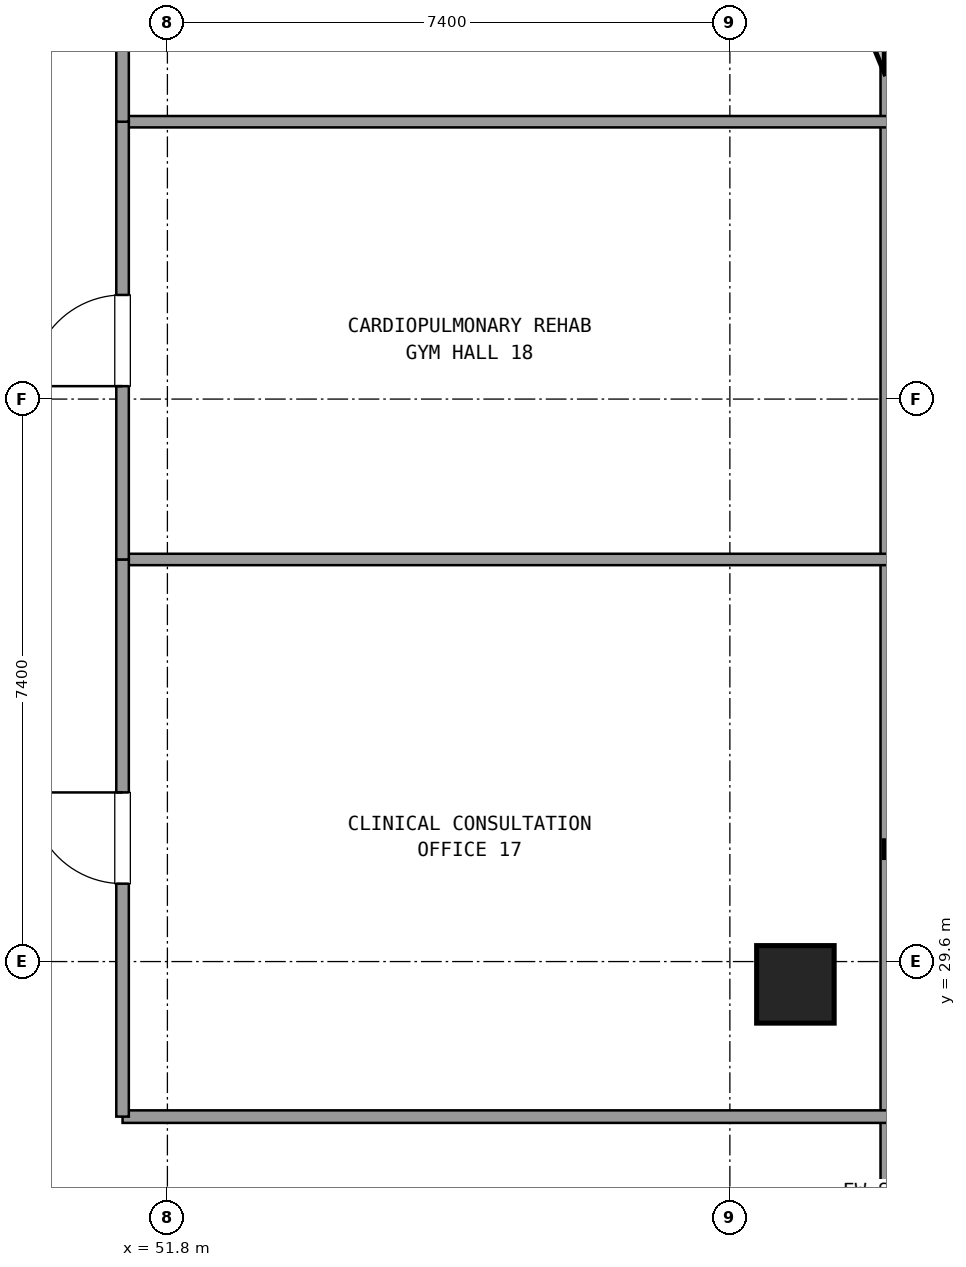
"""IFC4 building model, lengths in metres.
Left out: names, types, materials, properties, quantities, classifications, styles, units other than length and angle.
Written with IfcOpenShell. Run it as: python <this file> out.ifc"""

import sys

from ifc_helpers import new_model, si_unit, direction, frame, frame_2d, origin, origin_2d, place, context, subcontext, project, spatial, rectangle, extrude, element, fill, save


model = new_model("IFC4")
c1 = context("Model", 3, precision=1e-05, world=origin(), true_north=direction((0.0, 1.0)))
c2 = subcontext(c1, "Body", "Model", "MODEL_VIEW")
j1 = project(units=[si_unit("LENGTHUNIT", "METRE"), si_unit("PLANEANGLEUNIT", "RADIAN")], contexts=[c1])
p1 = place(None, origin())
s1 = spatial("IfcSite", under=j1, at=p1, CompositionType="ELEMENT")
p2 = place(p1, origin())
s2 = spatial("IfcBuilding", under=s1, at=p2, CompositionType="ELEMENT")
p3 = place(p2, frame((0.0, 0.0, 117.18)))
s3 = spatial("IfcBuildingStorey", under=s2, at=p3, CompositionType="ELEMENT", Elevation=117.18)
p4 = place(p3, frame((60.062, 29.3, 0.021), z_axis=(-0.084573087246, 0.0, 0.99641727851), x_axis=(0.0, -1.0, 0.0)))
e1 = element("IfcColumn", 1, at=p4, inside=s3, PredefinedType="COLUMN", context=c2, shape_type="SweptSolid", body=[
    extrude(rectangle(XDim=1.02, YDim=1.02, at=origin_2d()), origin(), (0.0, 0.0, 1.0), 3.571),
])
p5 = place(p3, frame((56.141, 42.252, 0.021), z_axis=(-0.084546909741, -0.024878799633, 0.996108862214), x_axis=(0.282292283154, -0.959328445774, 0.0)))
e2 = element("IfcColumn", 2, at=p5, inside=s3, PredefinedType="COLUMN", context=c2, shape_type="SweptSolid", body=[
    extrude(rectangle(XDim=1.02, YDim=1.02, at=origin_2d()), origin(), (0.0, 0.0, 1.0), 3.572),
])
p6 = place(p3, frame((61.302, 10.363, 0.0), z_axis=(0.0, 0.0, 1.0), x_axis=(0.0, 1.0, 0.0)))
e3 = element("IfcWall", 3, at=p6, inside=s3, PredefinedType="SOLIDWALL", context=c2, shape_type="SweptSolid", body=[
    extrude(rectangle(XDim=31.074, YDim=0.24, at=frame_2d((15.537, 0.0))), origin(), (0.0, 0.0, 1.0), 0.85),
])
p7 = place(p3, frame((51.21, 27.56, 0.0), z_axis=(0.0, 0.0, 1.0), x_axis=(1.0, 0.0, 0.0)))
e4 = element("IfcWall", 4, at=p7, inside=s3, PredefinedType="PARTITIONING", context=c2, shape_type="SweptSolid", body=[
    extrude(rectangle(XDim=10.072, YDim=0.165, at=frame_2d((5.036, 0.0))), origin(), (0.0, 0.0, 1.0), 2.61),
])
p8 = place(p3, frame((51.21, 34.89, 0.0), z_axis=(0.0, 0.0, 1.0), x_axis=(1.0, 0.0, 0.0)))
e5 = element("IfcWall", 5, at=p8, inside=s3, PredefinedType="PARTITIONING", context=c2, shape_type="SweptSolid", body=[
    extrude(rectangle(XDim=10.072, YDim=0.15, at=frame_2d((5.036, 0.0))), origin(), (0.0, 0.0, 1.0), 2.61),
])
p9 = place(p3, frame((51.21, 27.56, 0.0), z_axis=(0.0, 0.0, 1.0), x_axis=(0.0, 1.0, 0.0)))
e6 = element("IfcWall", 6, at=p9, inside=s3, PredefinedType="PARTITIONING", context=c2, shape_type="SweptSolid", body=[
    extrude(rectangle(XDim=7.33, YDim=0.165, at=frame_2d((3.665, 0.0))), origin(), (0.0, 0.0, 1.0), 2.61),
])
p10 = place(p9, frame((3.065, 0.0, 0.0)))
e7 = element("IfcOpeningElement", 7, at=p10, cuts=e6, PredefinedType="OPENING", context=c2, shape_type="SweptSolid", body=[
    extrude(rectangle(XDim=1.2, YDim=2.15, at=frame_2d((0.6, 1.075))), frame((0.0, 0.093, 0.0), z_axis=(0.0, -1.0, 0.0), x_axis=(1.0, 0.0, 0.0)), (0.0, 0.0, 1.0), 0.185),
])
p11 = place(p3, frame((51.21, 40.649, 0.0), z_axis=(0.0, 0.0, 1.0), x_axis=(1.0, 0.0, 0.0)))
e8 = element("IfcWall", 8, at=p11, inside=s3, PredefinedType="PARTITIONING", context=c2, shape_type="SweptSolid", body=[
    extrude(rectangle(XDim=10.072, YDim=0.15, at=frame_2d((5.036, 0.0))), origin(), (0.0, 0.0, 1.0), 2.61),
])
p12 = place(p3, frame((51.21, 34.89, 0.0), z_axis=(0.0, 0.0, 1.0), x_axis=(0.0, 1.0, 0.0)))
e9 = element("IfcWall", 9, at=p12, inside=s3, PredefinedType="PARTITIONING", context=c2, shape_type="SweptSolid", body=[
    extrude(rectangle(XDim=5.759, YDim=0.165, at=frame_2d((2.879, 0.0))), origin(), (0.0, 0.0, 1.0), 2.61),
])
p13 = place(p12, frame((2.28, 0.0, 0.0)))
e10 = element("IfcOpeningElement", 10, at=p13, cuts=e9, PredefinedType="OPENING", context=c2, shape_type="SweptSolid", body=[
    extrude(rectangle(XDim=1.2, YDim=2.15, at=frame_2d((0.6, 1.075))), frame((0.0, 0.093, 0.0), z_axis=(0.0, -1.0, 0.0), x_axis=(1.0, 0.0, 0.0)), (0.0, 0.0, 1.0), 0.185),
])
p14 = place(p3, frame((51.21, 40.649, 0.0), z_axis=(0.0, 0.0, 1.0), x_axis=(0.0, 1.0, 0.0)))
e11 = element("IfcWall", 11, at=p14, inside=s3, PredefinedType="PARTITIONING", context=c2, shape_type="SweptSolid", body=[
    extrude(rectangle(XDim=6.743, YDim=0.165, at=frame_2d((3.372, 0.0))), origin(), (0.0, 0.0, 1.0), 2.61),
])
p15 = place(p14, frame((2.772, 0.0, 0.0)))
e12 = element("IfcOpeningElement", 12, at=p15, cuts=e11, PredefinedType="OPENING", context=c2, shape_type="SweptSolid", body=[
    extrude(rectangle(XDim=1.2, YDim=2.15, at=frame_2d((0.6, 1.075))), frame((0.0, 0.093, 0.0), z_axis=(0.0, -1.0, 0.0), x_axis=(1.0, 0.0, 0.0)), (0.0, 0.0, 1.0), 0.185),
])
p16 = place(p10, origin())
e13 = element("IfcDoor", 13, at=p16, inside=s3, OperationType="SINGLE_SWING_RIGHT", PredefinedType="DOOR", context=c2, shape_type="SweptSolid", body=[
    extrude(rectangle(XDim=1.2, YDim=2.15, at=frame_2d((0.6, 1.075))), frame((0.0, 0.025, 0.0), z_axis=(0.0, -1.0, 0.0), x_axis=(1.0, 0.0, 0.0)), (0.0, 0.0, 1.0), 0.05),
])
fill(e7, e13)
p17 = place(p13, origin())
e14 = element("IfcDoor", 14, at=p17, inside=s3, OperationType="SINGLE_SWING_LEFT", PredefinedType="DOOR", context=c2, shape_type="SweptSolid", body=[
    extrude(rectangle(XDim=1.2, YDim=2.15, at=frame_2d((0.6, 1.075))), frame((0.0, 0.025, 0.0), z_axis=(0.0, -1.0, 0.0), x_axis=(1.0, 0.0, 0.0)), (0.0, 0.0, 1.0), 0.05),
])
fill(e10, e14)
save(model, sys.argv[1])
